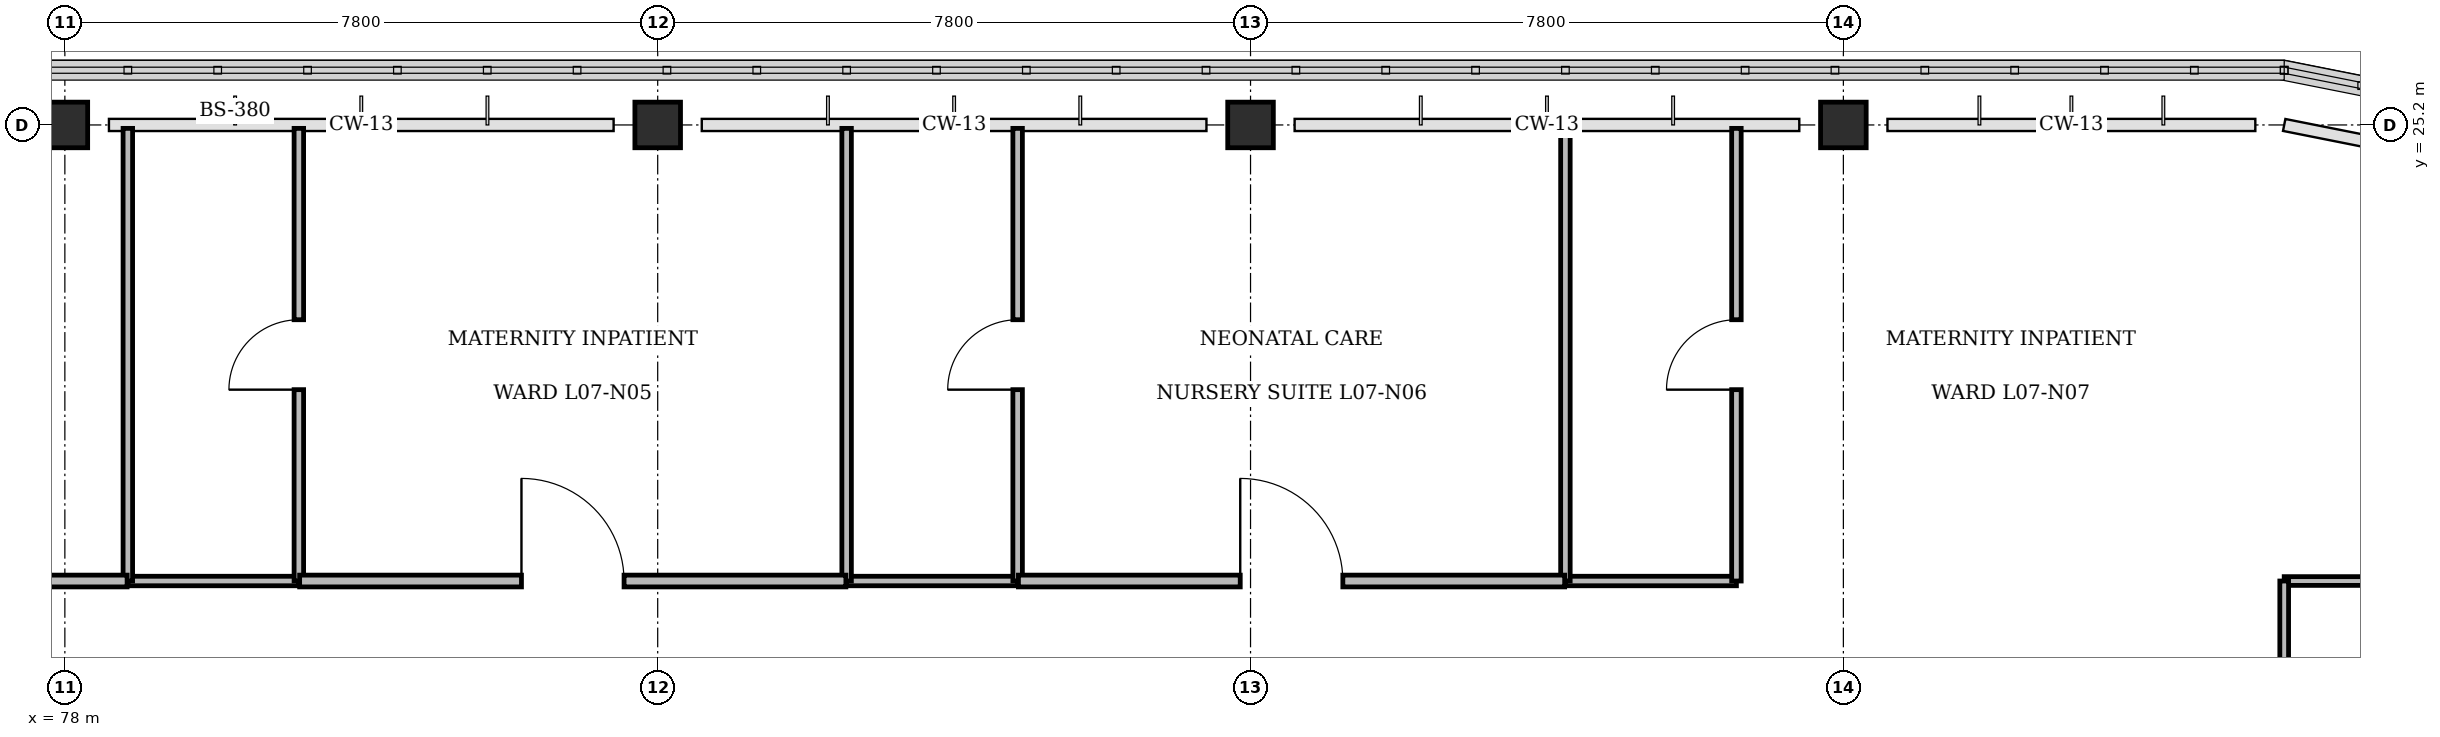
"""IFC4 building model, lengths in metres.
Left out: names, types, materials, properties, quantities, classifications, styles, units other than length and angle.
Written with IfcOpenShell. Run it as: python <this file> out.ifc"""

import sys

from ifc_helpers import new_model, si_unit, direction, frame, frame_2d, origin, origin_2d, place, context, subcontext, project, spatial, rectangle, extrude, element, fill, save


model = new_model("IFC4")
c1 = context("Model", 3, precision=1e-05, world=origin(), true_north=direction((0.0, 1.0)))
c2 = subcontext(c1, "Body", "Model", "MODEL_VIEW")
j1 = project(units=[si_unit("LENGTHUNIT", "METRE"), si_unit("PLANEANGLEUNIT", "RADIAN")], contexts=[c1])
p1 = place(None, origin())
s1 = spatial("IfcSite", under=j1, at=p1, CompositionType="ELEMENT")
p2 = place(p1, origin())
s2 = spatial("IfcBuilding", under=s1, at=p2, CompositionType="ELEMENT")
p3 = place(p2, frame((0.0, 0.0, 30.6)))
s3 = spatial("IfcBuildingStorey", under=s2, at=p3, CompositionType="ELEMENT", Elevation=30.6)
for number, where, z_axis, x_axis in (
    (1, (78.0, 25.2, 0.0), (0.0, 0.0, 1.0), (1.0, 0.0, 0.0)),
    (2, (85.8, 25.2, 0.0), (0.0, 0.0, 1.0), (1.0, 0.0, 0.0)),
    (3, (93.6, 25.2, 0.0), (0.0, 0.0, 1.0), (1.0, 0.0, 0.0)),
    (4, (101.4, 25.2, 0.0), (0.0, 0.0, 1.0), (1.0, 0.0, 0.0)),
):
    element("IfcColumn", number, at=place(p3, frame(where, z_axis=z_axis, x_axis=x_axis)), inside=s3, PredefinedType="COLUMN", context=c2, shape_type="SweptSolid", body=[
        extrude(rectangle(XDim=0.6, YDim=0.6, at=origin_2d()), origin(), (0.0, 0.0, 1.0), 4.2),
    ])
p4 = place(p3, frame((78.829, 19.2, 0.0), z_axis=(0.0, 0.0, 1.0), x_axis=(1.0, 0.0, 0.0)))
e5 = element("IfcWall", 5, at=p4, inside=s3, PredefinedType="PARTITIONING", context=c2, shape_type="SweptSolid", body=[
    extrude(rectangle(XDim=2.25, YDim=0.125, at=frame_2d((1.125, 0.0))), origin(), (0.0, 0.0, 1.0), 3.9),
])
p5 = place(p3, frame((78.829, 19.2, 0.0), z_axis=(0.0, 0.0, 1.0), x_axis=(0.0, 1.0, 0.0)))
e6 = element("IfcWall", 6, at=p5, inside=s3, PredefinedType="PARTITIONING", context=c2, shape_type="SweptSolid", body=[
    extrude(rectangle(XDim=5.955, YDim=0.125, at=frame_2d((2.978, 0.0))), origin(), (0.0, 0.0, 1.0), 3.9),
])
p6 = place(p3, frame((81.079, 19.2, 0.0), z_axis=(0.0, 0.0, 1.0), x_axis=(0.0, 1.0, 0.0)))
e7 = element("IfcWall", 7, at=p6, inside=s3, PredefinedType="PARTITIONING", context=c2, shape_type="SweptSolid", body=[
    extrude(rectangle(XDim=5.955, YDim=0.125, at=frame_2d((2.978, 0.0))), origin(), (0.0, 0.0, 1.0), 3.9),
])
p7 = place(p6, frame((2.518, 0.0, 0.0)))
e8 = element("IfcOpeningElement", 8, at=p7, cuts=e7, PredefinedType="OPENING", context=c2, shape_type="SweptSolid", body=[
    extrude(rectangle(XDim=0.92, YDim=2.1, at=frame_2d((0.46, 1.05))), frame((0.0, 0.073, 0.0), z_axis=(0.0, -1.0, 0.0), x_axis=(1.0, 0.0, 0.0)), (0.0, 0.0, 1.0), 0.145),
])
p8 = place(p3, frame((88.286, 19.2, 0.0), z_axis=(0.0, 0.0, 1.0), x_axis=(1.0, 0.0, 0.0)))
e9 = element("IfcWall", 9, at=p8, inside=s3, PredefinedType="PARTITIONING", context=c2, shape_type="SweptSolid", body=[
    extrude(rectangle(XDim=2.25, YDim=0.125, at=frame_2d((1.125, 0.0))), origin(), (0.0, 0.0, 1.0), 3.9),
])
p9 = place(p3, frame((88.286, 19.2, 0.0), z_axis=(0.0, 0.0, 1.0), x_axis=(0.0, 1.0, 0.0)))
e10 = element("IfcWall", 10, at=p9, inside=s3, PredefinedType="PARTITIONING", context=c2, shape_type="SweptSolid", body=[
    extrude(rectangle(XDim=5.955, YDim=0.125, at=frame_2d((2.978, 0.0))), origin(), (0.0, 0.0, 1.0), 3.9),
])
p10 = place(p3, frame((90.536, 19.2, 0.0), z_axis=(0.0, 0.0, 1.0), x_axis=(0.0, 1.0, 0.0)))
e11 = element("IfcWall", 11, at=p10, inside=s3, PredefinedType="PARTITIONING", context=c2, shape_type="SweptSolid", body=[
    extrude(rectangle(XDim=5.955, YDim=0.125, at=frame_2d((2.978, 0.0))), origin(), (0.0, 0.0, 1.0), 3.9),
])
p11 = place(p10, frame((2.518, 0.0, 0.0)))
e12 = element("IfcOpeningElement", 12, at=p11, cuts=e11, PredefinedType="OPENING", context=c2, shape_type="SweptSolid", body=[
    extrude(rectangle(XDim=0.92, YDim=2.1, at=frame_2d((0.46, 1.05))), frame((0.0, 0.073, 0.0), z_axis=(0.0, -1.0, 0.0), x_axis=(1.0, 0.0, 0.0)), (0.0, 0.0, 1.0), 0.145),
])
p12 = place(p3, frame((97.743, 19.2, 0.0), z_axis=(0.0, 0.0, 1.0), x_axis=(1.0, 0.0, 0.0)))
e13 = element("IfcWall", 13, at=p12, inside=s3, PredefinedType="PARTITIONING", context=c2, shape_type="SweptSolid", body=[
    extrude(rectangle(XDim=2.25, YDim=0.125, at=frame_2d((1.125, 0.0))), origin(), (0.0, 0.0, 1.0), 3.9),
])
p13 = place(p3, frame((97.743, 19.2, 0.0), z_axis=(0.0, 0.0, 1.0), x_axis=(0.0, 1.0, 0.0)))
e14 = element("IfcWall", 14, at=p13, inside=s3, PredefinedType="PARTITIONING", context=c2, shape_type="SweptSolid", body=[
    extrude(rectangle(XDim=5.955, YDim=0.125, at=frame_2d((2.978, 0.0))), origin(), (0.0, 0.0, 1.0), 3.9),
])
p14 = place(p3, frame((99.993, 19.2, 0.0), z_axis=(0.0, 0.0, 1.0), x_axis=(0.0, 1.0, 0.0)))
e15 = element("IfcWall", 15, at=p14, inside=s3, PredefinedType="PARTITIONING", context=c2, shape_type="SweptSolid", body=[
    extrude(rectangle(XDim=5.955, YDim=0.125, at=frame_2d((2.978, 0.0))), origin(), (0.0, 0.0, 1.0), 3.9),
])
p15 = place(p14, frame((2.518, 0.0, 0.0)))
e16 = element("IfcOpeningElement", 16, at=p15, cuts=e15, PredefinedType="OPENING", context=c2, shape_type="SweptSolid", body=[
    extrude(rectangle(XDim=0.92, YDim=2.1, at=frame_2d((0.46, 1.05))), frame((0.0, 0.073, 0.0), z_axis=(0.0, -1.0, 0.0), x_axis=(1.0, 0.0, 0.0)), (0.0, 0.0, 1.0), 0.145),
])
p16 = place(p3, frame((107.2, 19.2, 0.0), z_axis=(0.0, 0.0, 1.0), x_axis=(1.0, 0.0, 0.0)))
e17 = element("IfcWall", 17, at=p16, inside=s3, PredefinedType="PARTITIONING", context=c2, shape_type="SweptSolid", body=[
    extrude(rectangle(XDim=12.1, YDim=0.115, at=frame_2d((6.05, 0.0))), origin(), (0.0, 0.0, 1.0), 3.9),
])
p17 = place(p3, frame((107.2, 6.0, 0.0), z_axis=(0.0, 0.0, 1.0), x_axis=(0.0, 1.0, 0.0)))
e18 = element("IfcWall", 18, at=p17, inside=s3, PredefinedType="PARTITIONING", context=c2, shape_type="SweptSolid", body=[
    extrude(rectangle(XDim=13.2, YDim=0.115, at=frame_2d((6.6, 0.0))), origin(), (0.0, 0.0, 1.0), 3.9),
])
p18 = place(p17, frame((0.85, 0.0, 0.0)))
e19 = element("IfcOpeningElement", 19, at=p18, cuts=e18, PredefinedType="OPENING", context=c2, shape_type="SweptSolid", body=[
    extrude(rectangle(XDim=1.32, YDim=2.15, at=frame_2d((0.66, 1.075))), frame((0.0, 0.067, 0.0), z_axis=(0.0, -1.0, 0.0), x_axis=(1.0, 0.0, 0.0)), (0.0, 0.0, 1.0), 0.135),
])
p19 = place(p3, frame((71.631, 19.2, 0.0), z_axis=(0.0, 0.0, 1.0), x_axis=(1.0, 0.0, 0.0)))
e20 = element("IfcWall", 20, at=p19, inside=s3, PredefinedType="PARTITIONING", context=c2, shape_type="SweptSolid", body=[
    extrude(rectangle(XDim=7.188, YDim=0.155, at=frame_2d((3.594, 0.0))), origin(), (0.0, 0.0, 1.0), 3.9),
])
p20 = place(p19, frame((2.919, 0.0, 0.0)))
e21 = element("IfcOpeningElement", 21, at=p20, cuts=e20, PredefinedType="OPENING", context=c2, shape_type="SweptSolid", body=[
    extrude(rectangle(XDim=1.35, YDim=2.2, at=frame_2d((0.675, 1.1))), frame((0.0, 0.087, 0.0), z_axis=(0.0, -1.0, 0.0), x_axis=(1.0, 0.0, 0.0)), (0.0, 0.0, 1.0), 0.175),
])
p21 = place(p3, frame((81.089, 19.2, 0.0), z_axis=(0.0, 0.0, 1.0), x_axis=(1.0, 0.0, 0.0)))
e22 = element("IfcWall", 22, at=p21, inside=s3, PredefinedType="PARTITIONING", context=c2, shape_type="SweptSolid", body=[
    extrude(rectangle(XDim=7.187, YDim=0.155, at=frame_2d((3.593, 0.0))), origin(), (0.0, 0.0, 1.0), 3.9),
])
p22 = place(p21, frame((2.918, 0.0, 0.0)))
e23 = element("IfcOpeningElement", 23, at=p22, cuts=e22, PredefinedType="OPENING", context=c2, shape_type="SweptSolid", body=[
    extrude(rectangle(XDim=1.35, YDim=2.2, at=frame_2d((0.675, 1.1))), frame((0.0, 0.087, 0.0), z_axis=(0.0, -1.0, 0.0), x_axis=(1.0, 0.0, 0.0)), (0.0, 0.0, 1.0), 0.175),
])
p23 = place(p3, frame((90.546, 19.2, 0.0), z_axis=(0.0, 0.0, 1.0), x_axis=(1.0, 0.0, 0.0)))
e24 = element("IfcWall", 24, at=p23, inside=s3, PredefinedType="PARTITIONING", context=c2, shape_type="SweptSolid", body=[
    extrude(rectangle(XDim=7.187, YDim=0.155, at=frame_2d((3.594, 0.0))), origin(), (0.0, 0.0, 1.0), 3.9),
])
p24 = place(p23, frame((2.918, 0.0, 0.0)))
e25 = element("IfcOpeningElement", 25, at=p24, cuts=e24, PredefinedType="OPENING", context=c2, shape_type="SweptSolid", body=[
    extrude(rectangle(XDim=1.35, YDim=2.2, at=frame_2d((0.675, 1.1))), frame((0.0, 0.087, 0.0), z_axis=(0.0, -1.0, 0.0), x_axis=(1.0, 0.0, 0.0)), (0.0, 0.0, 1.0), 0.175),
])
p25 = place(p7, origin())
e26 = element("IfcDoor", 26, at=p25, inside=s3, OperationType="SINGLE_SWING_LEFT", PredefinedType="DOOR", context=c2, shape_type="SweptSolid", body=[
    extrude(rectangle(XDim=0.92, YDim=2.1, at=frame_2d((0.46, 1.05))), frame((0.0, 0.025, 0.0), z_axis=(0.0, -1.0, 0.0), x_axis=(1.0, 0.0, 0.0)), (0.0, 0.0, 1.0), 0.05),
])
fill(e8, e26)
p26 = place(p11, origin())
e27 = element("IfcDoor", 27, at=p26, inside=s3, OperationType="SINGLE_SWING_LEFT", PredefinedType="DOOR", context=c2, shape_type="SweptSolid", body=[
    extrude(rectangle(XDim=0.92, YDim=2.1, at=frame_2d((0.46, 1.05))), frame((0.0, 0.025, 0.0), z_axis=(0.0, -1.0, 0.0), x_axis=(1.0, 0.0, 0.0)), (0.0, 0.0, 1.0), 0.05),
])
fill(e12, e27)
p27 = place(p15, origin())
e28 = element("IfcDoor", 28, at=p27, inside=s3, OperationType="SINGLE_SWING_LEFT", PredefinedType="DOOR", context=c2, shape_type="SweptSolid", body=[
    extrude(rectangle(XDim=0.92, YDim=2.1, at=frame_2d((0.46, 1.05))), frame((0.0, 0.025, 0.0), z_axis=(0.0, -1.0, 0.0), x_axis=(1.0, 0.0, 0.0)), (0.0, 0.0, 1.0), 0.05),
])
fill(e16, e28)
p28 = place(p22, origin())
e29 = element("IfcDoor", 29, at=p28, inside=s3, OperationType="SINGLE_SWING_LEFT", PredefinedType="DOOR", context=c2, shape_type="SweptSolid", body=[
    extrude(rectangle(XDim=1.35, YDim=2.2, at=frame_2d((0.675, 1.1))), frame((0.0, 0.025, 0.0), z_axis=(0.0, -1.0, 0.0), x_axis=(1.0, 0.0, 0.0)), (0.0, 0.0, 1.0), 0.05),
])
fill(e23, e29)
p29 = place(p24, origin())
e30 = element("IfcDoor", 30, at=p29, inside=s3, OperationType="SINGLE_SWING_LEFT", PredefinedType="DOOR", context=c2, shape_type="SweptSolid", body=[
    extrude(rectangle(XDim=1.35, YDim=2.2, at=frame_2d((0.675, 1.1))), frame((0.0, 0.025, 0.0), z_axis=(0.0, -1.0, 0.0), x_axis=(1.0, 0.0, 0.0)), (0.0, 0.0, 1.0), 0.05),
])
fill(e25, e30)
save(model, sys.argv[1])
